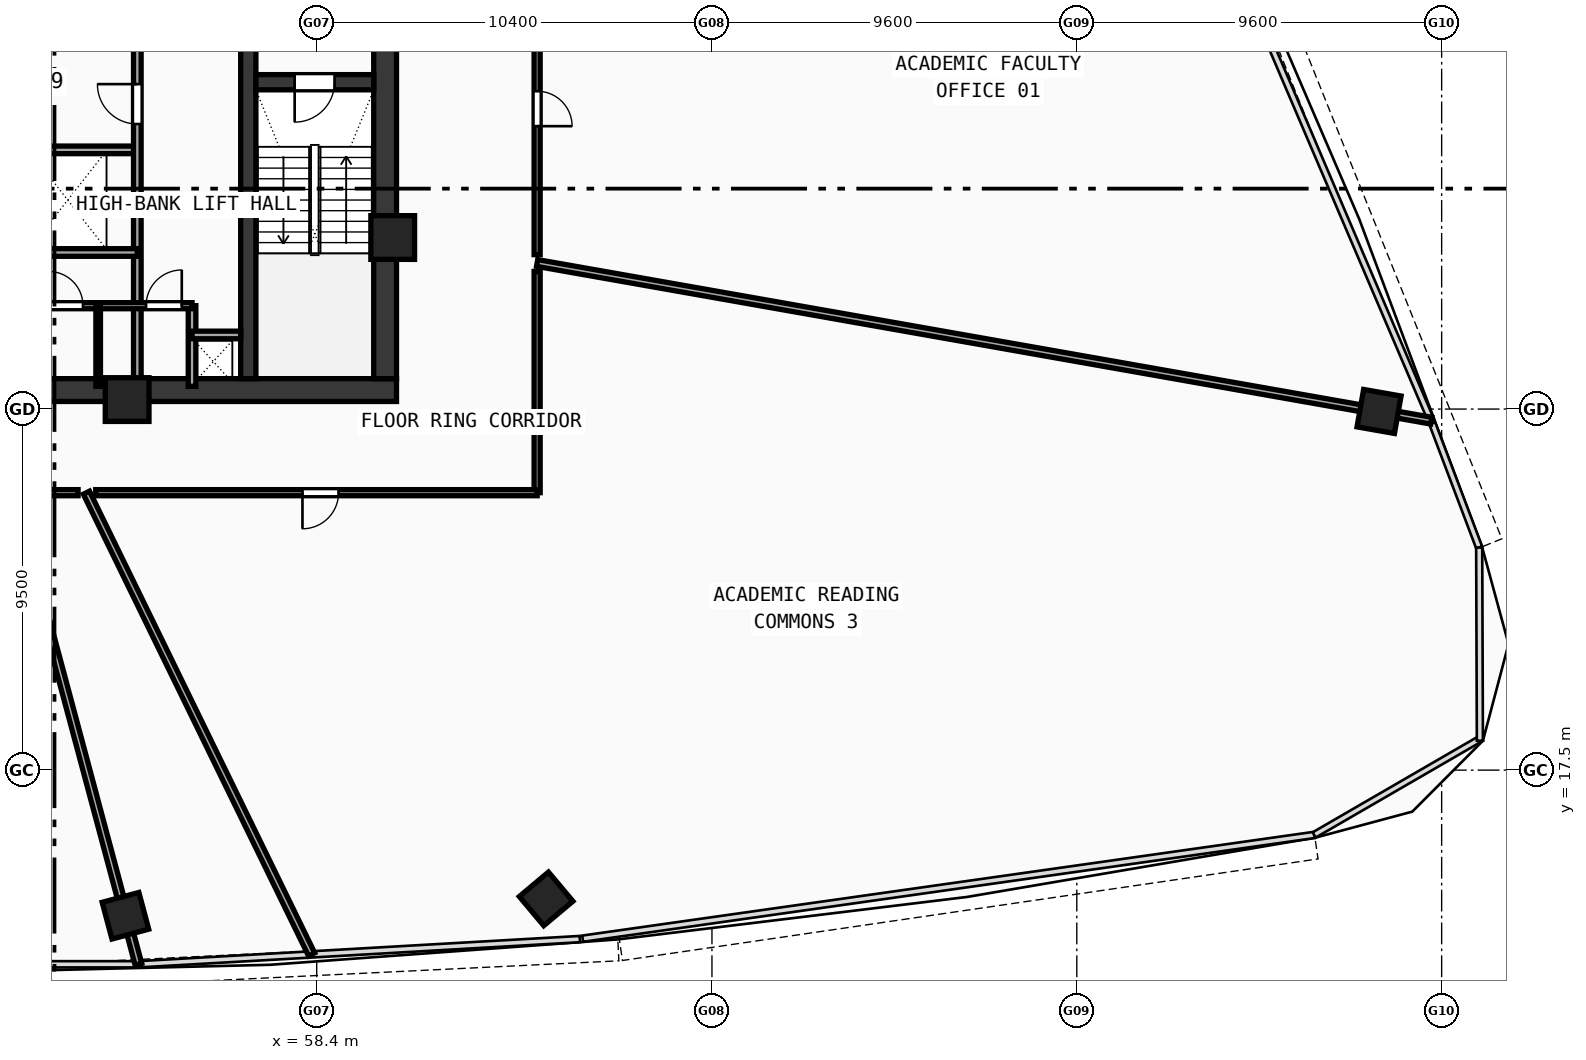
"""IFC4 building model, lengths in metres.
Left out: names, types, materials, properties, quantities, classifications, styles, units other than length and angle.
Written with IfcOpenShell. Run it as: python <this file> out.ifc"""

import sys

from ifc_helpers import new_model, si_unit, direction, frame, frame_2d, origin, origin_with_axes, origin_2d, place, context, subcontext, project, spatial, rectangle, hollow_rectangle, extrude, source, transform, mapped, element, fill, save


model = new_model("IFC4")
c1 = context("Model", 3, precision=1e-05, world=origin(), true_north=direction((0.0, 1.0)))
c2 = subcontext(c1, "Body", "Model", "MODEL_VIEW")
j1 = project(units=[si_unit("LENGTHUNIT", "METRE"), si_unit("PLANEANGLEUNIT", "RADIAN")], contexts=[c1])
p1 = place(None, origin())
s1 = spatial("IfcSite", under=j1, at=p1, CompositionType="ELEMENT")
p2 = place(p1, origin())
s2 = spatial("IfcBuilding", under=s1, at=p2, CompositionType="ELEMENT")
p3 = place(p2, frame((0.0, 0.0, 111.58)))
s3 = spatial("IfcBuildingStorey", under=s2, at=p3, CompositionType="ELEMENT", Elevation=111.58)
p4 = place(p3, frame((35.5, 27.5, 0.0), z_axis=(0.0, 0.0, 1.0), x_axis=(1.0, 0.0, 0.0)))
e1 = element("IfcWall", 1, at=p4, inside=s3, PredefinedType="SHEAR", context=c2, shape_type="SweptSolid", body=[
    extrude(rectangle(XDim=25.0, YDim=0.6, at=frame_2d((12.5, 0.0))), origin(), (0.0, 0.0, 1.0), 3.54),
])
p5 = place(p3, frame((60.2, 27.8, 0.0), z_axis=(0.0, 0.0, 1.0), x_axis=(0.0, 1.0, 0.0)))
e2 = element("IfcWall", 2, at=p5, inside=s3, PredefinedType="SHEAR", context=c2, shape_type="SweptSolid", body=[
    extrude(rectangle(XDim=12.1, YDim=0.6, at=frame_2d((6.05, 0.0))), origin(), (0.0, 0.0, 1.0), 3.54),
])
p6 = place(p3, frame((56.6, 27.8, 0.0), z_axis=(0.0, 0.0, 1.0), x_axis=(0.0, 1.0, 0.0)))
e3 = element("IfcWall", 3, at=p6, inside=s3, PredefinedType="SHEAR", context=c2, shape_type="SweptSolid", body=[
    extrude(rectangle(XDim=12.1, YDim=0.4, at=frame_2d((6.05, 0.0))), origin(), (0.0, 0.0, 1.0), 3.54),
])
p7 = place(p6, frame((9.95, 0.0, 0.0)))
e4 = element("IfcOpeningElement", 4, at=p7, cuts=e3, PredefinedType="OPENING", context=c2, shape_type="SweptSolid", body=[
    extrude(rectangle(XDim=1.1, YDim=2.1, at=frame_2d((0.55, 1.05))), frame((0.0, 0.21, 0.0), z_axis=(0.0, -1.0, 0.0), x_axis=(1.0, 0.0, 0.0)), (0.0, 0.0, 1.0), 0.42),
])
p8 = place(p3, frame((56.8, 35.6, 0.0), z_axis=(0.0, 0.0, 1.0), x_axis=(1.0, 0.0, 0.0)))
e5 = element("IfcWall", 5, at=p8, inside=s3, PredefinedType="SHEAR", context=c2, shape_type="SweptSolid", body=[
    extrude(rectangle(XDim=3.1, YDim=0.4, at=frame_2d((1.55, 0.0))), origin(), (0.0, 0.0, 1.0), 3.54),
])
p9 = place(p8, frame((1.02, 0.0, 0.0)))
e6 = element("IfcOpeningElement", 6, at=p9, cuts=e5, PredefinedType="OPENING", context=c2, shape_type="SweptSolid", body=[
    extrude(rectangle(XDim=1.05, YDim=2.1, at=frame_2d((0.525, 1.05))), frame((0.0, 0.21, 0.0), z_axis=(0.0, -1.0, 0.0), x_axis=(1.0, 0.0, 0.0)), (0.0, 0.0, 1.0), 0.42),
])
m1 = source(origin(), c2, "Body", "SweptSolid", [
    extrude(hollow_rectangle(XDim=1.15, YDim=1.15, WallThickness=0.048, at=origin_2d()), origin(), (0.0, 0.0, 1.0), 3.8),
])
for number, where, z_axis, x_axis in (
    (7, (53.412, 27.25, -0.26), (0.0, 0.0, 1.0), (1.0, 0.0, 0.0)),
    (8, (60.4, 31.513, -0.26), (0.0, 0.0, 1.0), (1.0, 0.0, 0.0)),
):
    element("IfcColumn", number, at=place(p3, frame(where, z_axis=z_axis, x_axis=x_axis)), inside=s3, PredefinedType="COLUMN", context=c2, shape_type="MappedRepresentation", body=[
        mapped(m1, transform((0.0, 0.0, 0.0), scale=1.0)),
    ])
m2 = source(origin(), c2, "Body", "SweptSolid", [
    extrude(hollow_rectangle(XDim=1.0, YDim=1.0, WallThickness=0.042, at=origin_2d()), origin(), (0.0, 0.0, 1.0), 3.8),
])
for number, where, z_axis, x_axis in (
    (9, (53.367, 13.668, -0.26), (0.0, 0.0, 1.0), (0.966, 0.259, 0.0)),
    (10, (64.436, 14.112, -0.26), (0.0, 0.0, 1.0), (0.766, 0.643, 0.0)),
    (11, (86.353, 26.938, -0.26), (0.0, 0.0, 1.0), (0.174, 0.985, 0.0)),
):
    element("IfcColumn", number, at=place(p3, frame(where, z_axis=z_axis, x_axis=x_axis)), inside=s3, PredefinedType="COLUMN", context=c2, shape_type="MappedRepresentation", body=[
        mapped(m2, transform((0.0, 0.0, 0.0), scale=1.0)),
    ])
p10 = place(p3, frame((43.85, 33.82, 0.0), z_axis=(0.0, 0.0, 1.0), x_axis=(1.0, 0.0, 0.0)))
e12 = element("IfcWall", 12, at=p10, inside=s3, PredefinedType="SOLIDWALL", context=c2, shape_type="SweptSolid", body=[
    extrude(rectangle(XDim=9.83, YDim=0.2, at=frame_2d((4.915, 0.0))), origin(), (0.0, 0.0, 1.0), 3.54),
])
p11 = place(p3, frame((53.68, 27.6, 0.0), z_axis=(0.0, 0.0, 1.0), x_axis=(0.0, 1.0, 0.0)))
e13 = element("IfcWall", 13, at=p11, inside=s3, PredefinedType="SOLIDWALL", context=c2, shape_type="SweptSolid", body=[
    extrude(rectangle(XDim=9.05, YDim=0.2, at=frame_2d((4.525, 0.0))), origin(), (0.0, 0.0, 1.0), 3.54),
])
p12 = place(p11, frame((6.9, 0.0, 0.0)))
e14 = element("IfcOpeningElement", 14, at=p12, cuts=e13, PredefinedType="OPENING", context=c2, shape_type="SweptSolid", body=[
    extrude(rectangle(XDim=1.05, YDim=2.1, at=frame_2d((0.525, 1.05))), frame((0.0, 0.11, 0.0), z_axis=(0.0, -1.0, 0.0), x_axis=(1.0, 0.0, 0.0)), (0.0, 0.0, 1.0), 0.22),
])
p13 = place(p3, frame((43.85, 31.12, 0.0), z_axis=(0.0, 0.0, 1.0), x_axis=(1.0, 0.0, 0.0)))
e15 = element("IfcWall", 15, at=p13, inside=s3, PredefinedType="SOLIDWALL", context=c2, shape_type="SweptSolid", body=[
    extrude(rectangle(XDim=9.83, YDim=0.2, at=frame_2d((4.915, 0.0))), origin(), (0.0, 0.0, 1.0), 3.54),
])
p14 = place(p3, frame((55.12, 27.6, 0.0), z_axis=(0.0, 0.0, 1.0), x_axis=(0.0, 1.0, 0.0)))
e16 = element("IfcWall", 16, at=p14, inside=s3, PredefinedType="SOLIDWALL", context=c2, shape_type="SweptSolid", body=[
    extrude(rectangle(XDim=2.12, YDim=0.2, at=frame_2d((1.06, 0.0))), origin(), (0.0, 0.0, 1.0), 3.54),
])
p15 = place(p3, frame((55.12, 28.95, 0.0), z_axis=(0.0, 0.0, 1.0), x_axis=(1.0, 0.0, 0.0)))
e17 = element("IfcWall", 17, at=p15, inside=s3, PredefinedType="SOLIDWALL", context=c2, shape_type="SweptSolid", body=[
    extrude(rectangle(XDim=1.28, YDim=0.2, at=frame_2d((0.64, 0.0))), origin(), (0.0, 0.0, 1.0), 3.54),
])
p16 = place(p3, frame((51.05, 29.72, 0.0), z_axis=(0.0, 0.0, 1.0), x_axis=(1.0, 0.0, 0.0)))
e18 = element("IfcWall", 18, at=p16, inside=s3, PredefinedType="PARTITIONING", context=c2, shape_type="SweptSolid", body=[
    extrude(rectangle(XDim=4.07, YDim=0.16, at=frame_2d((2.035, 0.0))), origin(), (0.0, 0.0, 1.0), 3.54),
])
p17 = place(p16, frame((0.3, 0.0, 0.0)))
e19 = element("IfcOpeningElement", 19, at=p17, cuts=e18, PredefinedType="OPENING", context=c2, shape_type="SweptSolid", body=[
    extrude(rectangle(XDim=0.9, YDim=2.1, at=frame_2d((0.45, 1.05))), frame((0.0, 0.09, 0.0), z_axis=(0.0, -1.0, 0.0), x_axis=(1.0, 0.0, 0.0)), (0.0, 0.0, 1.0), 0.18),
])
p18 = place(p16, frame((2.86, 0.0, 0.0)))
e20 = element("IfcOpeningElement", 20, at=p18, cuts=e18, PredefinedType="OPENING", context=c2, shape_type="SweptSolid", body=[
    extrude(rectangle(XDim=0.94, YDim=2.1, at=frame_2d((0.47, 1.05))), frame((0.0, 0.09, 0.0), z_axis=(0.0, -1.0, 0.0), x_axis=(1.0, 0.0, 0.0)), (0.0, 0.0, 1.0), 0.18),
])
p19 = place(p3, frame((52.65, 27.6, 0.0), z_axis=(0.0, 0.0, 1.0), x_axis=(0.0, 1.0, 0.0)))
e21 = element("IfcWall", 21, at=p19, inside=s3, PredefinedType="PARTITIONING", context=c2, shape_type="SweptSolid", body=[
    extrude(rectangle(XDim=2.12, YDim=0.12, at=frame_2d((1.06, 0.0))), origin(), (0.0, 0.0, 1.0), 3.54),
])
p20 = place(p3, frame((50.385, 24.8, 0.0), z_axis=(0.0, 0.0, 1.0), x_axis=(0.258818094647, -0.965926080962, 0.0)))
e22 = element("IfcWall", 22, at=p20, inside=s3, PredefinedType="PARTITIONING", context=c2, shape_type="SweptSolid", body=[
    extrude(rectangle(XDim=12.847, YDim=0.18, at=frame_2d((6.423, 0.0))), origin(), (0.0, 0.0, 1.0), 2.84),
])
p21 = place(p3, frame((52.341, 24.8, 0.0), z_axis=(0.0, 0.0, 1.0), x_axis=(0.438370251769, -0.898794482829, 0.0)))
e23 = element("IfcWall", 23, at=p21, inside=s3, PredefinedType="PARTITIONING", context=c2, shape_type="SweptSolid", body=[
    extrude(rectangle(XDim=13.517, YDim=0.18, at=frame_2d((6.758, 0.0))), origin(), (0.0, 0.0, 1.0), 2.84),
])
p22 = place(p3, frame((64.2, 30.844, 0.0), z_axis=(0.0, 0.0, 1.0), x_axis=(0.98480783024, -0.173647739683, 0.0)))
e24 = element("IfcWall", 24, at=p22, inside=s3, PredefinedType="PARTITIONING", context=c2, shape_type="SweptSolid", body=[
    extrude(rectangle(XDim=23.889, YDim=0.18, at=frame_2d((11.944, 0.0))), origin(), (0.0, 0.0, 1.0), 2.84),
])
p23 = place(p3, frame((64.2, 38.744, 0.0), z_axis=(0.0, 0.0, 1.0), x_axis=(0.0, -1.0, 0.0)))
e25 = element("IfcWall", 25, at=p23, inside=s3, PredefinedType="PARTITIONING", context=c2, shape_type="SweptSolid", body=[
    extrude(rectangle(XDim=7.681, YDim=0.16, at=frame_2d((3.84, 0.0))), origin(), (0.0, 0.0, 1.0), 3.54),
])
p24 = place(p23, frame((3.38, 0.0, 0.0)))
e26 = element("IfcOpeningElement", 26, at=p24, cuts=e25, PredefinedType="OPENING", context=c2, shape_type="SweptSolid", body=[
    extrude(rectangle(XDim=0.92, YDim=2.1, at=frame_2d((0.46, 1.05))), frame((0.0, 0.09, 0.0), z_axis=(0.0, -1.0, 0.0), x_axis=(1.0, 0.0, 0.0)), (0.0, 0.0, 1.0), 0.18),
])
p25 = place(p3, frame((64.2, 30.62, 0.0), z_axis=(0.0, 0.0, 1.0), x_axis=(0.0, -1.0, 0.0)))
e27 = element("IfcWall", 27, at=p25, inside=s3, PredefinedType="PARTITIONING", context=c2, shape_type="SweptSolid", body=[
    extrude(rectangle(XDim=5.82, YDim=0.16, at=frame_2d((2.91, 0.0))), origin(), (0.0, 0.0, 1.0), 3.14),
])
p26 = place(p3, frame((64.2, 24.8, 0.0), z_axis=(0.0, 0.0, 1.0), x_axis=(-1.0, 0.0, 0.0)))
e28 = element("IfcWall", 28, at=p26, inside=s3, PredefinedType="PARTITIONING", context=c2, shape_type="SweptSolid", body=[
    extrude(rectangle(XDim=11.614, YDim=0.16, at=frame_2d((5.807, 0.0))), origin(), (0.0, 0.0, 1.0), 2.84),
])
p27 = place(p26, frame((5.225, 0.0, 0.0)))
e29 = element("IfcOpeningElement", 29, at=p27, cuts=e28, PredefinedType="OPENING", context=c2, shape_type="SweptSolid", body=[
    extrude(rectangle(XDim=0.95, YDim=2.1, at=frame_2d((0.475, 1.05))), frame((0.0, 0.09, 0.0), z_axis=(0.0, -1.0, 0.0), x_axis=(1.0, 0.0, 0.0)), (0.0, 0.0, 1.0), 0.18),
])
p28 = place(p3, frame((52.121, 24.8, 0.0), z_axis=(0.0, 0.0, 1.0), x_axis=(-1.0, 0.0, 0.0)))
e30 = element("IfcWall", 30, at=p28, inside=s3, PredefinedType="PARTITIONING", context=c2, shape_type="SweptSolid", body=[
    extrude(rectangle(XDim=1.509, YDim=0.16, at=frame_2d((0.754, 0.0))), origin(), (0.0, 0.0, 1.0), 3.54),
])
m3 = source(origin(), c2, "Body", "SweptSolid", [
    extrude(rectangle(XDim=1.05, YDim=2.1, at=frame_2d((0.525, 1.05))), frame((0.0, 0.025, 0.0), z_axis=(0.0, -1.0, 0.0), x_axis=(1.0, 0.0, 0.0)), (0.0, 0.0, 1.0), 0.05),
])
p29 = place(p9, frame((1.05, 0.0, 0.0), z_axis=(0.0, 0.0, 1.0), x_axis=(-1.0, 0.0, 0.0)))
e31 = element("IfcDoor", 31, at=p29, inside=s3, OperationType="SINGLE_SWING_RIGHT", PredefinedType="DOOR", context=c2, shape_type="MappedRepresentation", body=[
    mapped(m3, transform((0.0, 0.0, 0.0), scale=1.0)),
])
fill(e6, e31)
p30 = place(p12, origin_with_axes())
e32 = element("IfcDoor", 32, at=p30, inside=s3, OperationType="SINGLE_SWING_RIGHT", PredefinedType="DOOR", context=c2, shape_type="MappedRepresentation", body=[
    mapped(m3, transform((0.0, 0.0, 0.0), scale=1.0)),
])
fill(e14, e32)
m4 = source(origin(), c2, "Body", "SweptSolid", [
    extrude(rectangle(XDim=0.9, YDim=2.1, at=frame_2d((0.45, 1.05))), frame((0.0, 0.025, 0.0), z_axis=(0.0, -1.0, 0.0), x_axis=(1.0, 0.0, 0.0)), (0.0, 0.0, 1.0), 0.05),
])
p31 = place(p17, origin_with_axes())
e33 = element("IfcDoor", 33, at=p31, inside=s3, OperationType="SINGLE_SWING_LEFT", PredefinedType="DOOR", context=c2, shape_type="MappedRepresentation", body=[
    mapped(m4, transform((0.0, 0.0, 0.0), scale=1.0)),
])
fill(e19, e33)
m5 = source(origin(), c2, "Body", "SweptSolid", [
    extrude(rectangle(XDim=0.94, YDim=2.1, at=frame_2d((0.47, 1.05))), frame((0.0, 0.025, 0.0), z_axis=(0.0, -1.0, 0.0), x_axis=(1.0, 0.0, 0.0)), (0.0, 0.0, 1.0), 0.05),
])
p32 = place(p18, origin_with_axes())
e34 = element("IfcDoor", 34, at=p32, inside=s3, OperationType="SINGLE_SWING_RIGHT", PredefinedType="DOOR", context=c2, shape_type="MappedRepresentation", body=[
    mapped(m5, transform((0.0, 0.0, 0.0), scale=1.0)),
])
fill(e20, e34)
m6 = source(origin(), c2, "Body", "SweptSolid", [
    extrude(rectangle(XDim=0.92, YDim=2.1, at=frame_2d((0.46, 1.05))), frame((0.0, 0.025, 0.0), z_axis=(0.0, -1.0, 0.0), x_axis=(1.0, 0.0, 0.0)), (0.0, 0.0, 1.0), 0.05),
])
p33 = place(p24, origin_with_axes())
e35 = element("IfcDoor", 35, at=p33, inside=s3, OperationType="SINGLE_SWING_RIGHT", PredefinedType="DOOR", context=c2, shape_type="MappedRepresentation", body=[
    mapped(m6, transform((0.0, 0.0, 0.0), scale=1.0)),
])
fill(e26, e35)
m7 = source(origin(), c2, "Body", "SweptSolid", [
    extrude(rectangle(XDim=0.95, YDim=2.1, at=frame_2d((0.475, 1.05))), frame((0.0, 0.025, 0.0), z_axis=(0.0, -1.0, 0.0), x_axis=(1.0, 0.0, 0.0)), (0.0, 0.0, 1.0), 0.05),
])
p34 = place(p27, origin_with_axes())
e36 = element("IfcDoor", 36, at=p34, inside=s3, OperationType="SINGLE_SWING_RIGHT", PredefinedType="DOOR", context=c2, shape_type="MappedRepresentation", body=[
    mapped(m7, transform((0.0, 0.0, 0.0), scale=1.0)),
])
fill(e29, e36)
save(model, sys.argv[1])
